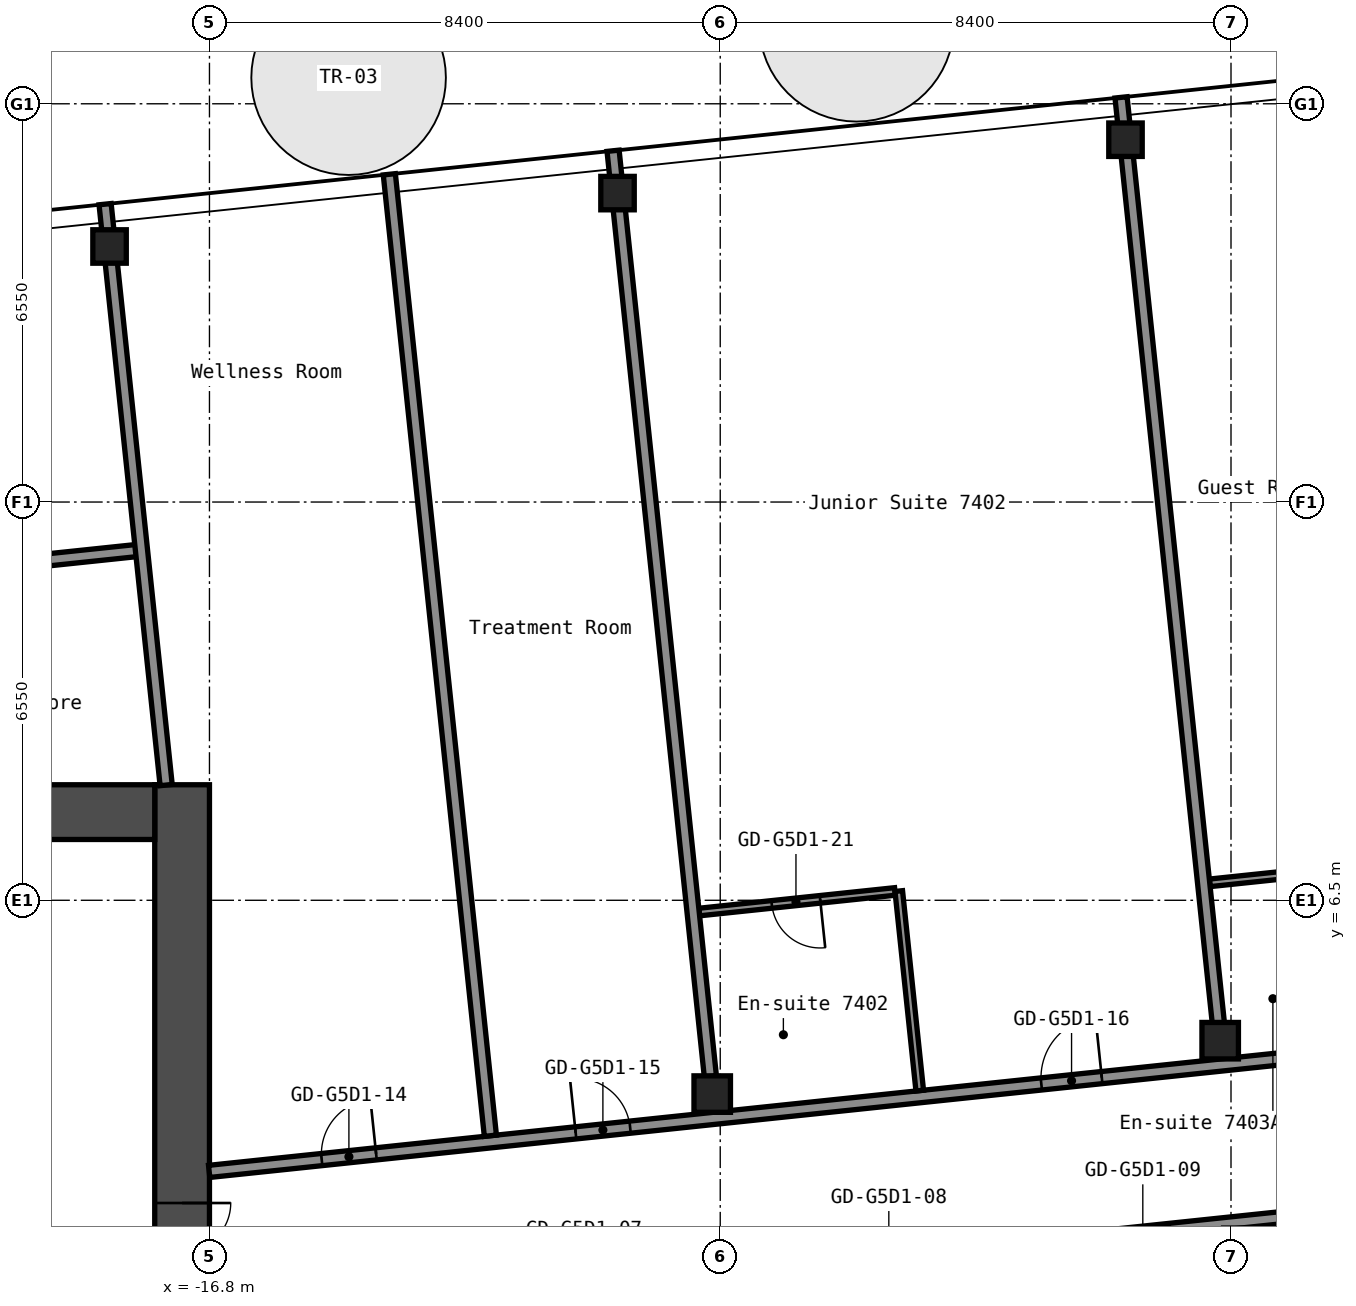
"""IFC4 building model, lengths in metres.
Left out: names, types, materials, properties, quantities, classifications, styles, units other than length and angle.
Written with IfcOpenShell. Run it as: python <this file> out.ifc"""

import sys

from ifc_helpers import new_model, si_unit, direction, frame, frame_2d, origin, origin_2d, place, context, subcontext, project, spatial, rectangle, hollow_rectangle, extrude, element, fill, save


model = new_model("IFC4")
c1 = context("Model", 3, precision=1e-05, world=origin(), true_north=direction((0.0, 1.0)))
c2 = subcontext(c1, "Body", "Model", "MODEL_VIEW")
j1 = project(units=[si_unit("LENGTHUNIT", "METRE"), si_unit("PLANEANGLEUNIT", "RADIAN")], contexts=[c1])
p1 = place(None, origin())
s1 = spatial("IfcSite", under=j1, at=p1, CompositionType="ELEMENT")
p2 = place(p1, origin())
s2 = spatial("IfcBuilding", under=s1, at=p2, CompositionType="ELEMENT")
p3 = place(p2, frame((0.0, 0.0, 261.4)))
s3 = spatial("IfcBuildingStorey", under=s2, at=p3, CompositionType="ELEMENT", Elevation=261.4)
p4 = place(p3, frame((-18.443, 17.253, 0.0), z_axis=(0.0, 0.0, 1.0), x_axis=(1.0, 0.0, 0.0)))
e1 = element("IfcColumn", 1, at=p4, inside=s3, PredefinedType="COLUMN", context=c2, shape_type="SweptSolid", body=[
    extrude(hollow_rectangle(XDim=0.55, YDim=0.55, WallThickness=0.022, InnerFilletRadius=0.033, OuterFilletRadius=0.055, at=origin_2d()), origin(), (0.0, 0.0, 1.0), 2.75),
])
p5 = place(p3, frame((-8.532, 3.312, 0.0), z_axis=(0.0, 0.0, 1.0), x_axis=(1.0, 0.0, 0.0)))
e2 = element("IfcColumn", 2, at=p5, inside=s3, PredefinedType="COLUMN", context=c2, shape_type="SweptSolid", body=[
    extrude(hollow_rectangle(XDim=0.6, YDim=0.6, WallThickness=0.025, InnerFilletRadius=0.038, OuterFilletRadius=0.062, at=origin_2d()), origin(), (0.0, 0.0, 1.0), 2.75),
])
p6 = place(p3, frame((-10.089, 18.131, 0.0), z_axis=(0.0, 0.0, 1.0), x_axis=(1.0, 0.0, 0.0)))
e3 = element("IfcColumn", 3, at=p6, inside=s3, PredefinedType="COLUMN", context=c2, shape_type="SweptSolid", body=[
    extrude(hollow_rectangle(XDim=0.55, YDim=0.55, WallThickness=0.022, InnerFilletRadius=0.033, OuterFilletRadius=0.055, at=origin_2d()), origin(), (0.0, 0.0, 1.0), 2.75),
])
p7 = place(p3, frame((-0.178, 4.191, 0.0), z_axis=(0.0, 0.0, 1.0), x_axis=(1.0, 0.0, 0.0)))
e4 = element("IfcColumn", 4, at=p7, inside=s3, PredefinedType="COLUMN", context=c2, shape_type="SweptSolid", body=[
    extrude(hollow_rectangle(XDim=0.6, YDim=0.6, WallThickness=0.025, InnerFilletRadius=0.038, OuterFilletRadius=0.062, at=origin_2d()), origin(), (0.0, 0.0, 1.0), 2.75),
])
p8 = place(p3, frame((-1.735, 19.009, 0.0), z_axis=(0.0, 0.0, 1.0), x_axis=(1.0, 0.0, 0.0)))
e5 = element("IfcColumn", 5, at=p8, inside=s3, PredefinedType="COLUMN", context=c2, shape_type="SweptSolid", body=[
    extrude(hollow_rectangle(XDim=0.55, YDim=0.55, WallThickness=0.022, InnerFilletRadius=0.033, OuterFilletRadius=0.055, at=origin_2d()), origin(), (0.0, 0.0, 1.0), 2.75),
])
p9 = place(p3, frame((-17.25, -8.4, 0.0), z_axis=(0.0, 0.0, 1.0), x_axis=(0.0, 1.0, 0.0)))
e6 = element("IfcWall", 6, at=p9, inside=s3, PredefinedType="SHEAR", context=c2, shape_type="SweptSolid", body=[
    extrude(rectangle(XDim=16.8, YDim=0.9, at=frame_2d((8.4, 0.0))), origin(), (0.0, 0.0, 1.0), 2.75),
])
p10 = place(p9, frame((8.321, 0.0, 0.0)))
e7 = element("IfcOpeningElement", 7, at=p10, cuts=e6, PredefinedType="OPENING", context=c2, shape_type="SweptSolid", body=[
    extrude(rectangle(XDim=1.6, YDim=2.1, at=frame_2d((0.8, 1.05))), frame((0.0, 0.46, 0.0), z_axis=(0.0, -1.0, 0.0), x_axis=(1.0, 0.0, 0.0)), (0.0, 0.0, 1.0), 0.92),
])
p11 = place(p3, frame((-32.7, 7.95, 0.0), z_axis=(0.0, 0.0, 1.0), x_axis=(1.0, 0.0, 0.0)))
e8 = element("IfcWall", 8, at=p11, inside=s3, PredefinedType="SHEAR", context=c2, shape_type="SweptSolid", body=[
    extrude(rectangle(XDim=15.0, YDim=0.9, at=frame_2d((7.5, 0.0))), origin(), (0.0, 0.0, 1.0), 2.75),
])
p12 = place(p11, frame((3.4, 0.0, 0.0)))
e9 = element("IfcOpeningElement", 9, at=p12, cuts=e8, PredefinedType="OPENING", context=c2, shape_type="SweptSolid", body=[
    extrude(rectangle(XDim=1.2, YDim=2.1, at=frame_2d((0.6, 1.05))), frame((0.0, 0.46, 0.0), z_axis=(0.0, -1.0, 0.0), x_axis=(1.0, 0.0, 0.0)), (0.0, 0.0, 1.0), 0.92),
])
p13 = place(p11, frame((0.75, 0.0, 0.0)))
e10 = element("IfcOpeningElement", 10, at=p13, cuts=e8, PredefinedType="OPENING", context=c2, shape_type="SweptSolid", body=[
    extrude(rectangle(XDim=0.9, YDim=2.1, at=frame_2d((0.45, 1.05))), frame((0.0, 0.46, 0.0), z_axis=(0.0, -1.0, 0.0), x_axis=(1.0, 0.0, 0.0)), (0.0, 0.0, 1.0), 0.92),
])
p14 = place(p3, frame((-16.572, -0.549, 0.0), z_axis=(0.0, 0.0, 1.0), x_axis=(0.994521146831, 0.104535584879, 0.0)))
e11 = element("IfcWall", 11, at=p14, inside=s3, PredefinedType="PARTITIONING", context=c2, shape_type="SweptSolid", body=[
    extrude(rectangle(XDim=33.561, YDim=0.2, at=frame_2d((16.78, 0.0))), origin(), (0.0, 0.0, 1.0), 2.75),
])
p15 = place(p14, frame((1.315, 0.0, 0.0)))
e12 = element("IfcOpeningElement", 12, at=p15, cuts=e11, PredefinedType="OPENING", context=c2, shape_type="SweptSolid", body=[
    extrude(rectangle(XDim=0.9, YDim=2.1, at=frame_2d((0.45, 1.05))), frame((0.0, 0.11, 0.0), z_axis=(0.0, -1.0, 0.0), x_axis=(1.0, 0.0, 0.0)), (0.0, 0.0, 1.0), 0.22),
])
p16 = place(p14, frame((5.515, 0.0, 0.0)))
e13 = element("IfcOpeningElement", 13, at=p16, cuts=e11, PredefinedType="OPENING", context=c2, shape_type="SweptSolid", body=[
    extrude(rectangle(XDim=0.9, YDim=2.1, at=frame_2d((0.45, 1.05))), frame((0.0, 0.11, 0.0), z_axis=(0.0, -1.0, 0.0), x_axis=(1.0, 0.0, 0.0)), (0.0, 0.0, 1.0), 0.22),
])
p17 = place(p14, frame((10.555, 0.0, 0.0)))
e14 = element("IfcOpeningElement", 14, at=p17, cuts=e11, PredefinedType="OPENING", context=c2, shape_type="SweptSolid", body=[
    extrude(rectangle(XDim=0.9, YDim=2.1, at=frame_2d((0.45, 1.05))), frame((0.0, 0.11, 0.0), z_axis=(0.0, -1.0, 0.0), x_axis=(1.0, 0.0, 0.0)), (0.0, 0.0, 1.0), 0.22),
])
p18 = place(p14, frame((14.755, 0.0, 0.0)))
e15 = element("IfcOpeningElement", 15, at=p18, cuts=e11, PredefinedType="OPENING", context=c2, shape_type="SweptSolid", body=[
    extrude(rectangle(XDim=0.9, YDim=2.1, at=frame_2d((0.45, 1.05))), frame((0.0, 0.11, 0.0), z_axis=(0.0, -1.0, 0.0), x_axis=(1.0, 0.0, 0.0)), (0.0, 0.0, 1.0), 0.22),
])
p19 = place(p14, frame((19.65, 0.0, 0.0)))
e16 = element("IfcOpeningElement", 16, at=p19, cuts=e11, PredefinedType="OPENING", context=c2, shape_type="SweptSolid", body=[
    extrude(rectangle(XDim=1.0, YDim=2.1, at=frame_2d((0.5, 1.05))), frame((0.0, 0.11, 0.0), z_axis=(0.0, -1.0, 0.0), x_axis=(1.0, 0.0, 0.0)), (0.0, 0.0, 1.0), 0.22),
])
p20 = place(p14, frame((21.35, 0.0, 0.0)))
e17 = element("IfcOpeningElement", 17, at=p20, cuts=e11, PredefinedType="OPENING", context=c2, shape_type="SweptSolid", body=[
    extrude(rectangle(XDim=1.0, YDim=2.1, at=frame_2d((0.5, 1.05))), frame((0.0, 0.11, 0.0), z_axis=(0.0, -1.0, 0.0), x_axis=(1.0, 0.0, 0.0)), (0.0, 0.0, 1.0), 0.22),
])
p21 = place(p14, frame((27.185, 0.0, 0.0)))
e18 = element("IfcOpeningElement", 18, at=p21, cuts=e11, PredefinedType="OPENING", context=c2, shape_type="SweptSolid", body=[
    extrude(rectangle(XDim=0.9, YDim=2.1, at=frame_2d((0.45, 1.05))), frame((0.0, 0.11, 0.0), z_axis=(0.0, -1.0, 0.0), x_axis=(1.0, 0.0, 0.0)), (0.0, 0.0, 1.0), 0.22),
])
p22 = place(p14, frame((31.385, 0.0, 0.0)))
e19 = element("IfcOpeningElement", 19, at=p22, cuts=e11, PredefinedType="OPENING", context=c2, shape_type="SweptSolid", body=[
    extrude(rectangle(XDim=0.9, YDim=2.1, at=frame_2d((0.45, 1.05))), frame((0.0, 0.11, 0.0), z_axis=(0.0, -1.0, 0.0), x_axis=(1.0, 0.0, 0.0)), (0.0, 0.0, 1.0), 0.22),
])
p23 = place(p3, frame((-16.805, 2.041, 0.0), z_axis=(0.0, 0.0, 1.0), x_axis=(0.994521146831, 0.104535584879, 0.0)))
e20 = element("IfcWall", 20, at=p23, inside=s3, PredefinedType="PARTITIONING", context=c2, shape_type="SweptSolid", body=[
    extrude(rectangle(XDim=33.561, YDim=0.2, at=frame_2d((16.78, 0.0))), origin(), (0.0, 0.0, 1.0), 2.75),
])
p24 = place(p23, frame((1.861, 0.0, 0.0)))
e21 = element("IfcOpeningElement", 21, at=p24, cuts=e20, PredefinedType="OPENING", context=c2, shape_type="SweptSolid", body=[
    extrude(rectangle(XDim=0.9, YDim=2.1, at=frame_2d((0.45, 1.05))), frame((0.0, 0.11, 0.0), z_axis=(0.0, -1.0, 0.0), x_axis=(1.0, 0.0, 0.0)), (0.0, 0.0, 1.0), 0.22),
])
p25 = place(p23, frame((6.061, 0.0, 0.0)))
e22 = element("IfcOpeningElement", 22, at=p25, cuts=e20, PredefinedType="OPENING", context=c2, shape_type="SweptSolid", body=[
    extrude(rectangle(XDim=0.9, YDim=2.1, at=frame_2d((0.45, 1.05))), frame((0.0, 0.11, 0.0), z_axis=(0.0, -1.0, 0.0), x_axis=(1.0, 0.0, 0.0)), (0.0, 0.0, 1.0), 0.22),
])
p26 = place(p23, frame((13.761, 0.0, 0.0)))
e23 = element("IfcOpeningElement", 23, at=p26, cuts=e20, PredefinedType="OPENING", context=c2, shape_type="SweptSolid", body=[
    extrude(rectangle(XDim=1.0, YDim=2.1, at=frame_2d((0.5, 1.05))), frame((0.0, 0.11, 0.0), z_axis=(0.0, -1.0, 0.0), x_axis=(1.0, 0.0, 0.0)), (0.0, 0.0, 1.0), 0.22),
])
p27 = place(p23, frame((19.611, 0.0, 0.0)))
e24 = element("IfcOpeningElement", 24, at=p27, cuts=e20, PredefinedType="OPENING", context=c2, shape_type="SweptSolid", body=[
    extrude(rectangle(XDim=1.0, YDim=2.1, at=frame_2d((0.5, 1.05))), frame((0.0, 0.11, 0.0), z_axis=(0.0, -1.0, 0.0), x_axis=(1.0, 0.0, 0.0)), (0.0, 0.0, 1.0), 0.22),
])
p28 = place(p23, frame((21.311, 0.0, 0.0)))
e25 = element("IfcOpeningElement", 25, at=p28, cuts=e20, PredefinedType="OPENING", context=c2, shape_type="SweptSolid", body=[
    extrude(rectangle(XDim=1.0, YDim=2.1, at=frame_2d((0.5, 1.05))), frame((0.0, 0.11, 0.0), z_axis=(0.0, -1.0, 0.0), x_axis=(1.0, 0.0, 0.0)), (0.0, 0.0, 1.0), 0.22),
])
p29 = place(p23, frame((27.231, 0.0, 0.0)))
e26 = element("IfcOpeningElement", 26, at=p29, cuts=e20, PredefinedType="OPENING", context=c2, shape_type="SweptSolid", body=[
    extrude(rectangle(XDim=0.9, YDim=2.1, at=frame_2d((0.45, 1.05))), frame((0.0, 0.11, 0.0), z_axis=(0.0, -1.0, 0.0), x_axis=(1.0, 0.0, 0.0)), (0.0, 0.0, 1.0), 0.22),
])
p30 = place(p23, frame((31.431, 0.0, 0.0)))
e27 = element("IfcOpeningElement", 27, at=p30, cuts=e20, PredefinedType="OPENING", context=c2, shape_type="SweptSolid", body=[
    extrude(rectangle(XDim=0.9, YDim=2.1, at=frame_2d((0.45, 1.05))), frame((0.0, 0.11, 0.0), z_axis=(0.0, -1.0, 0.0), x_axis=(1.0, 0.0, 0.0)), (0.0, 0.0, 1.0), 0.22),
])
p31 = place(p3, frame((-0.35, 6.787, 0.0), z_axis=(0.0, 0.0, 1.0), x_axis=(0.994519751088, 0.104548862722, 0.0)))
e28 = element("IfcWall", 28, at=p31, inside=s3, PredefinedType="PARTITIONING", context=c2, shape_type="SweptSolid", body=[
    extrude(rectangle(XDim=2.337, YDim=0.125, at=frame_2d((1.169, 0.0))), origin(), (0.0, 0.0, 1.0), 2.75),
])
p32 = place(p3, frame((-8.746, 6.307, 0.0), z_axis=(0.0, 0.0, 1.0), x_axis=(0.994522794159, 0.104519911488, 0.0)))
e29 = element("IfcWall", 29, at=p32, inside=s3, PredefinedType="PARTITIONING", context=c2, shape_type="SweptSolid", body=[
    extrude(rectangle(XDim=3.238, YDim=0.125, at=frame_2d((1.619, 0.0))), origin(), (0.0, 0.0, 1.0), 2.75),
])
p33 = place(p32, frame((1.2, 0.0, 0.0)))
e30 = element("IfcOpeningElement", 30, at=p33, cuts=e29, PredefinedType="OPENING", context=c2, shape_type="SweptSolid", body=[
    extrude(rectangle(XDim=0.8, YDim=2.1, at=frame_2d((0.4, 1.05))), frame((0.0, 0.073, 0.0), z_axis=(0.0, -1.0, 0.0), x_axis=(1.0, 0.0, 0.0)), (0.0, 0.0, 1.0), 0.145),
])
p34 = place(p3, frame((-39.102, 10.034, 0.0), z_axis=(0.0, 0.0, 1.0), x_axis=(0.994522585465, 0.104521897229, 0.0)))
e31 = element("IfcWall", 31, at=p34, inside=s3, PredefinedType="PARTITIONING", context=c2, shape_type="SweptSolid", body=[
    extrude(rectangle(XDim=21.3, YDim=0.2, at=frame_2d((10.65, 0.0))), origin(), (0.0, 0.0, 1.0), 2.75),
])
p35 = place(p34, frame((3.05, 0.0, 0.0)))
e32 = element("IfcOpeningElement", 32, at=p35, cuts=e31, PredefinedType="OPENING", context=c2, shape_type="SweptSolid", body=[
    extrude(rectangle(XDim=1.0, YDim=2.1, at=frame_2d((0.5, 1.05))), frame((0.0, 0.11, 0.0), z_axis=(0.0, -1.0, 0.0), x_axis=(1.0, 0.0, 0.0)), (0.0, 0.0, 1.0), 0.22),
])
p36 = place(p34, frame((6.74, 0.0, 0.0)))
e33 = element("IfcOpeningElement", 33, at=p36, cuts=e31, PredefinedType="OPENING", context=c2, shape_type="SweptSolid", body=[
    extrude(rectangle(XDim=0.9, YDim=2.1, at=frame_2d((0.45, 1.05))), frame((0.0, 0.11, 0.0), z_axis=(0.0, -1.0, 0.0), x_axis=(1.0, 0.0, 0.0)), (0.0, 0.0, 1.0), 0.22),
])
p37 = place(p34, frame((10.94, 0.0, 0.0)))
e34 = element("IfcOpeningElement", 34, at=p37, cuts=e31, PredefinedType="OPENING", context=c2, shape_type="SweptSolid", body=[
    extrude(rectangle(XDim=0.9, YDim=2.1, at=frame_2d((0.45, 1.05))), frame((0.0, 0.11, 0.0), z_axis=(0.0, -1.0, 0.0), x_axis=(1.0, 0.0, 0.0)), (0.0, 0.0, 1.0), 0.22),
])
p38 = place(p34, frame((13.96, 0.0, 0.0)))
e35 = element("IfcOpeningElement", 35, at=p38, cuts=e31, PredefinedType="OPENING", context=c2, shape_type="SweptSolid", body=[
    extrude(rectangle(XDim=0.9, YDim=2.1, at=frame_2d((0.45, 1.05))), frame((0.0, 0.11, 0.0), z_axis=(0.0, -1.0, 0.0), x_axis=(1.0, 0.0, 0.0)), (0.0, 0.0, 1.0), 0.22),
])
p39 = place(p34, frame((18.16, 0.0, 0.0)))
e36 = element("IfcOpeningElement", 36, at=p39, cuts=e31, PredefinedType="OPENING", context=c2, shape_type="SweptSolid", body=[
    extrude(rectangle(XDim=0.9, YDim=2.1, at=frame_2d((0.45, 1.05))), frame((0.0, 0.11, 0.0), z_axis=(0.0, -1.0, 0.0), x_axis=(1.0, 0.0, 0.0)), (0.0, 0.0, 1.0), 0.22),
])
p40 = place(p3, frame((-17.512, 8.395, 0.0), z_axis=(0.0, 0.0, 1.0), x_axis=(-0.104524714473, 0.994522289375, 0.0)))
e37 = element("IfcWall", 37, at=p40, inside=s3, PredefinedType="PARTITIONING", context=c2, shape_type="SweptSolid", body=[
    extrude(rectangle(XDim=9.607, YDim=0.2, at=frame_2d((4.803, 0.0))), origin(), (0.0, 0.0, 1.0), 2.75),
])
p41 = place(p3, frame((-12.18, 2.627, 0.0), z_axis=(0.0, 0.0, 1.0), x_axis=(-0.104519331095, 0.994522855156, 0.0)))
e38 = element("IfcWall", 38, at=p41, inside=s3, PredefinedType="PARTITIONING", context=c2, shape_type="SweptSolid", body=[
    extrude(rectangle(XDim=15.9, YDim=0.2, at=frame_2d((7.95, 0.0))), origin(), (0.0, 0.0, 1.0), 2.75),
])
p42 = place(p3, frame((-8.562, 3.603, 0.0), z_axis=(0.0, 0.0, 1.0), x_axis=(-0.104523729364, 0.99452239291, 0.0)))
e39 = element("IfcWall", 39, at=p42, inside=s3, PredefinedType="PARTITIONING", context=c2, shape_type="SweptSolid", body=[
    extrude(rectangle(XDim=15.308, YDim=0.2, at=frame_2d((7.654, 0.0))), origin(), (0.0, 0.0, 1.0), 2.75),
])
p43 = place(p3, frame((-5.119, 3.37, 0.0), z_axis=(0.0, 0.0, 1.0), x_axis=(-0.104534592565, 0.994521251134, 0.0)))
e40 = element("IfcWall", 40, at=p43, inside=s3, PredefinedType="PARTITIONING", context=c2, shape_type="SweptSolid", body=[
    extrude(rectangle(XDim=3.3, YDim=0.125, at=frame_2d((1.65, 0.0))), origin(), (0.0, 0.0, 1.0), 2.75),
])
p44 = place(p3, frame((-0.208, 4.481, 0.0), z_axis=(0.0, 0.0, 1.0), x_axis=(-0.104523729364, 0.99452239291, 0.0)))
e41 = element("IfcWall", 41, at=p44, inside=s3, PredefinedType="PARTITIONING", context=c2, shape_type="SweptSolid", body=[
    extrude(rectangle(XDim=15.308, YDim=0.2, at=frame_2d((7.654, 0.0))), origin(), (0.0, 0.0, 1.0), 2.75),
])
p45 = place(p10, origin())
e42 = element("IfcDoor", 42, at=p45, inside=s3, OperationType="DOUBLE_DOOR_SINGLE_SWING", PredefinedType="DOOR", context=c2, shape_type="SweptSolid", body=[
    extrude(rectangle(XDim=1.6, YDim=2.1, at=frame_2d((0.8, 1.05))), frame((0.0, 0.025, 0.0), z_axis=(0.0, -1.0, 0.0), x_axis=(1.0, 0.0, 0.0)), (0.0, 0.0, 1.0), 0.05),
])
fill(e7, e42)
p46 = place(p24, origin())
e43 = element("IfcDoor", 43, at=p46, inside=s3, OperationType="SINGLE_SWING_LEFT", PredefinedType="DOOR", context=c2, shape_type="SweptSolid", body=[
    extrude(rectangle(XDim=0.9, YDim=2.1, at=frame_2d((0.45, 1.05))), frame((0.0, 0.025, 0.0), z_axis=(0.0, -1.0, 0.0), x_axis=(1.0, 0.0, 0.0)), (0.0, 0.0, 1.0), 0.05),
])
fill(e21, e43)
p47 = place(p25, origin())
e44 = element("IfcDoor", 44, at=p47, inside=s3, OperationType="SINGLE_SWING_RIGHT", PredefinedType="DOOR", context=c2, shape_type="SweptSolid", body=[
    extrude(rectangle(XDim=0.9, YDim=2.1, at=frame_2d((0.45, 1.05))), frame((0.0, 0.025, 0.0), z_axis=(0.0, -1.0, 0.0), x_axis=(1.0, 0.0, 0.0)), (0.0, 0.0, 1.0), 0.05),
])
fill(e22, e44)
p48 = place(p26, origin())
e45 = element("IfcDoor", 45, at=p48, inside=s3, OperationType="SINGLE_SWING_LEFT", PredefinedType="DOOR", context=c2, shape_type="SweptSolid", body=[
    extrude(rectangle(XDim=1.0, YDim=2.1, at=frame_2d((0.5, 1.05))), frame((0.0, 0.025, 0.0), z_axis=(0.0, -1.0, 0.0), x_axis=(1.0, 0.0, 0.0)), (0.0, 0.0, 1.0), 0.05),
])
fill(e23, e45)
p49 = place(p33, origin())
e46 = element("IfcDoor", 46, at=p49, inside=s3, OperationType="SINGLE_SWING_RIGHT", PredefinedType="DOOR", context=c2, shape_type="SweptSolid", body=[
    extrude(rectangle(XDim=0.8, YDim=2.1, at=frame_2d((0.4, 1.05))), frame((0.0, 0.025, 0.0), z_axis=(0.0, -1.0, 0.0), x_axis=(1.0, 0.0, 0.0)), (0.0, 0.0, 1.0), 0.05),
])
fill(e30, e46)
save(model, sys.argv[1])
